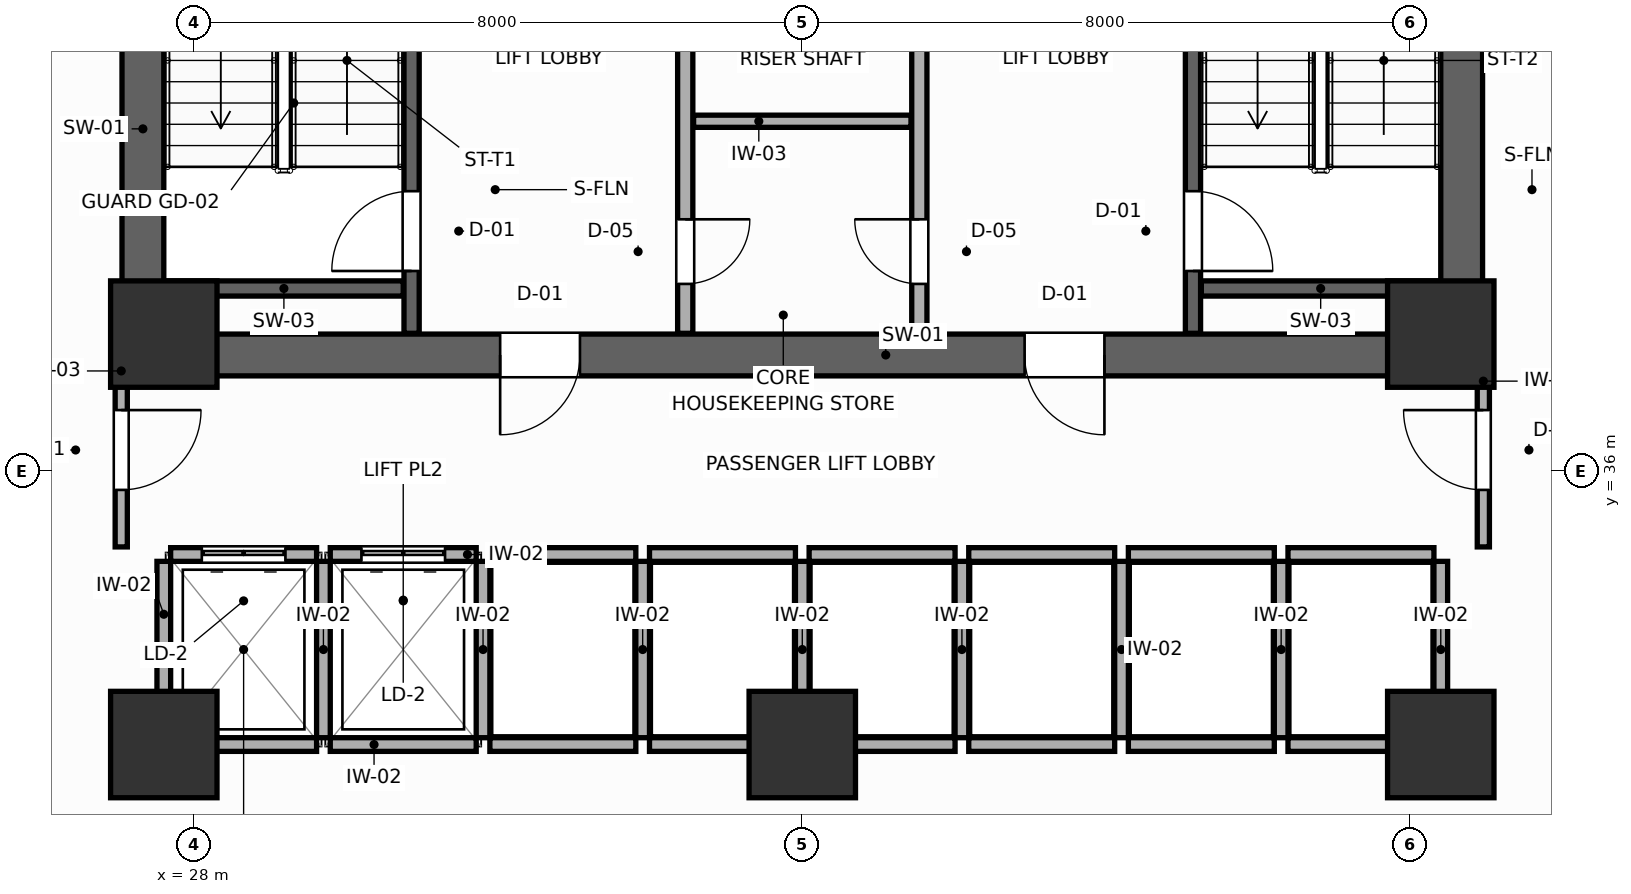
"""IFC4 building model, lengths in metres.
Left out: names, types, materials, properties, quantities, classifications, styles, units other than length and angle.
Written with IfcOpenShell. Run it as: python <this file> out.ifc"""

import sys

from ifc_helpers import new_model, si_unit, direction, frame, frame_2d, origin, origin_2d, place, context, subcontext, project, spatial, rectangle, extrude, source, transform, mapped, element, fill, save


model = new_model("IFC4")
c1 = context("Model", 3, precision=1e-05, world=origin(), true_north=direction((0.0, 1.0)))
c2 = subcontext(c1, "Body", "Model", "MODEL_VIEW")
j1 = project(units=[si_unit("LENGTHUNIT", "METRE"), si_unit("PLANEANGLEUNIT", "RADIAN")], contexts=[c1])
p1 = place(None, origin())
s1 = spatial("IfcSite", under=j1, at=p1, CompositionType="ELEMENT")
p2 = place(p1, origin())
s2 = spatial("IfcBuilding", under=s1, at=p2, CompositionType="ELEMENT")
p3 = place(p2, frame((0.0, 0.0, 87.3)))
s3 = spatial("IfcBuildingStorey", under=s2, at=p3, CompositionType="ELEMENT", Elevation=87.3)
p4 = place(p3, frame((27.05, 37.525, 0.0), z_axis=(0.0, 0.0, 1.0), x_axis=(1.0, 0.0, 0.0)))
e1 = element("IfcWall", 1, at=p4, inside=s3, PredefinedType="SHEAR", context=c2, shape_type="SweptSolid", body=[
    extrude(rectangle(XDim=17.9, YDim=0.55, at=frame_2d((8.95, 0.0))), origin(), (0.0, 0.0, 1.0), 3.9),
])
p5 = place(p4, frame((4.975, 0.0, 0.0)))
e2 = element("IfcOpeningElement", 2, at=p5, cuts=e1, PredefinedType="OPENING", context=c2, shape_type="SweptSolid", body=[
    extrude(rectangle(XDim=1.05, YDim=2.1, at=frame_2d((0.525, 1.05))), frame((0.0, 0.285, 0.0), z_axis=(0.0, -1.0, 0.0), x_axis=(1.0, 0.0, 0.0)), (0.0, 0.0, 1.0), 0.57),
])
p6 = place(p4, frame((11.875, 0.0, 0.0)))
e3 = element("IfcOpeningElement", 3, at=p6, cuts=e1, PredefinedType="OPENING", context=c2, shape_type="SweptSolid", body=[
    extrude(rectangle(XDim=1.05, YDim=2.1, at=frame_2d((0.525, 1.05))), frame((0.0, 0.285, 0.0), z_axis=(0.0, -1.0, 0.0), x_axis=(1.0, 0.0, 0.0)), (0.0, 0.0, 1.0), 0.57),
])
for number, where, z_axis, x_axis in (
    (4, (27.325, 37.8, 0.0), (0.0, 0.0, 1.0), (0.0, 1.0, 0.0)),
    (5, (44.675, 37.8, 0.0), (0.0, 0.0, 1.0), (0.0, 1.0, 0.0)),
):
    element("IfcWall", number, at=place(p3, frame(where, z_axis=z_axis, x_axis=x_axis)), inside=s3, PredefinedType="SHEAR", context=c2, shape_type="SweptSolid", body=[
        extrude(rectangle(XDim=9.0, YDim=0.55, at=frame_2d((4.5, 0.0))), origin(), (0.0, 0.0, 1.0), 3.9),
    ])
m1 = source(origin(), c2, "Body", "SweptSolid", [
    extrude(rectangle(XDim=1.4, YDim=1.4, at=origin_2d()), origin(), (0.0, 0.0, 1.0), 3.9),
])
for number, where, z_axis, x_axis in (
    (6, (27.6, 37.8, 0.0), (0.0, 0.0, 1.0), (1.0, 0.0, 0.0)),
    (7, (44.4, 37.8, 0.0), (0.0, 0.0, 1.0), (1.0, 0.0, 0.0)),
    (8, (27.6, 32.4, 0.0), (0.0, 0.0, 1.0), (1.0, 0.0, 0.0)),
    (9, (44.4, 32.4, 0.0), (0.0, 0.0, 1.0), (1.0, 0.0, 0.0)),
    (10, (36.0, 32.4, 0.0), (0.0, 0.0, 1.0), (1.0, 0.0, 0.0)),
):
    element("IfcColumn", number, at=place(p3, frame(where, z_axis=z_axis, x_axis=x_axis)), inside=s3, PredefinedType="COLUMN", context=c2, shape_type="MappedRepresentation", body=[
        mapped(m1, transform((0.0, 0.0, 0.0), scale=1.0)),
    ])
p7 = place(p3, frame((30.86, 37.81, 0.0), z_axis=(0.0, 0.0, 1.0), x_axis=(0.0, 1.0, 0.0)))
e11 = element("IfcWall", 11, at=p7, inside=s3, PredefinedType="SHEAR", context=c2, shape_type="SweptSolid", body=[
    extrude(rectangle(XDim=8.98, YDim=0.2, at=frame_2d((4.49, 0.0))), origin(), (0.0, 0.0, 1.0), 3.9),
])
p8 = place(p7, frame((0.82, 0.0, 0.0)))
e12 = element("IfcOpeningElement", 12, at=p8, cuts=e11, PredefinedType="OPENING", context=c2, shape_type="SweptSolid", body=[
    extrude(rectangle(XDim=1.05, YDim=2.1, at=frame_2d((0.525, 1.05))), frame((0.0, 0.11, 0.0), z_axis=(0.0, -1.0, 0.0), x_axis=(1.0, 0.0, 0.0)), (0.0, 0.0, 1.0), 0.22),
])
p9 = place(p3, frame((27.61, 38.4, 0.0), z_axis=(0.0, 0.0, 1.0), x_axis=(1.0, 0.0, 0.0)))
e13 = element("IfcWall", 13, at=p9, inside=s3, PredefinedType="SHEAR", context=c2, shape_type="SweptSolid", body=[
    extrude(rectangle(XDim=3.14, YDim=0.2, at=frame_2d((1.57, 0.0))), origin(), (0.0, 0.0, 1.0), 3.9),
])
p10 = place(p3, frame((41.14, 37.81, 0.0), z_axis=(0.0, 0.0, 1.0), x_axis=(0.0, 1.0, 0.0)))
e14 = element("IfcWall", 14, at=p10, inside=s3, PredefinedType="SHEAR", context=c2, shape_type="SweptSolid", body=[
    extrude(rectangle(XDim=8.98, YDim=0.2, at=frame_2d((4.49, 0.0))), origin(), (0.0, 0.0, 1.0), 3.9),
])
p11 = place(p10, frame((0.82, 0.0, 0.0)))
e15 = element("IfcOpeningElement", 15, at=p11, cuts=e14, PredefinedType="OPENING", context=c2, shape_type="SweptSolid", body=[
    extrude(rectangle(XDim=1.05, YDim=2.1, at=frame_2d((0.525, 1.05))), frame((0.0, 0.11, 0.0), z_axis=(0.0, -1.0, 0.0), x_axis=(1.0, 0.0, 0.0)), (0.0, 0.0, 1.0), 0.22),
])
p12 = place(p3, frame((41.25, 38.4, 0.0), z_axis=(0.0, 0.0, 1.0), x_axis=(1.0, 0.0, 0.0)))
e16 = element("IfcWall", 16, at=p12, inside=s3, PredefinedType="SHEAR", context=c2, shape_type="SweptSolid", body=[
    extrude(rectangle(XDim=3.14, YDim=0.2, at=frame_2d((1.57, 0.0))), origin(), (0.0, 0.0, 1.0), 3.9),
])
p13 = place(p3, frame((34.46, 37.81, 0.0), z_axis=(0.0, 0.0, 1.0), x_axis=(0.0, 1.0, 0.0)))
e17 = element("IfcWall", 17, at=p13, inside=s3, PredefinedType="PARTITIONING", context=c2, shape_type="SweptSolid", body=[
    extrude(rectangle(XDim=8.98, YDim=0.2, at=frame_2d((4.49, 0.0))), origin(), (0.0, 0.0, 1.0), 3.68),
])
p14 = place(p13, frame((0.65, 0.0, 0.0)))
e18 = element("IfcOpeningElement", 18, at=p14, cuts=e17, PredefinedType="OPENING", context=c2, shape_type="SweptSolid", body=[
    extrude(rectangle(XDim=0.85, YDim=2.05, at=frame_2d((0.425, 1.025))), frame((0.0, 0.11, 0.0), z_axis=(0.0, -1.0, 0.0), x_axis=(1.0, 0.0, 0.0)), (0.0, 0.0, 1.0), 0.22),
])
p15 = place(p3, frame((37.54, 37.81, 0.0), z_axis=(0.0, 0.0, 1.0), x_axis=(0.0, 1.0, 0.0)))
e19 = element("IfcWall", 19, at=p15, inside=s3, PredefinedType="PARTITIONING", context=c2, shape_type="SweptSolid", body=[
    extrude(rectangle(XDim=8.98, YDim=0.2, at=frame_2d((4.49, 0.0))), origin(), (0.0, 0.0, 1.0), 3.68),
])
p16 = place(p15, frame((0.65, 0.0, 0.0)))
e20 = element("IfcOpeningElement", 20, at=p16, cuts=e19, PredefinedType="OPENING", context=c2, shape_type="SweptSolid", body=[
    extrude(rectangle(XDim=0.85, YDim=2.05, at=frame_2d((0.425, 1.025))), frame((0.0, 0.11, 0.0), z_axis=(0.0, -1.0, 0.0), x_axis=(1.0, 0.0, 0.0)), (0.0, 0.0, 1.0), 0.22),
])
p17 = place(p3, frame((34.57, 40.6, 0.0), z_axis=(0.0, 0.0, 1.0), x_axis=(1.0, 0.0, 0.0)))
e21 = element("IfcWall", 21, at=p17, inside=s3, PredefinedType="PARTITIONING", context=c2, shape_type="SweptSolid", body=[
    extrude(rectangle(XDim=2.86, YDim=0.16, at=frame_2d((1.43, 0.0))), origin(), (0.0, 0.0, 1.0), 3.68),
])
p18 = place(p3, frame((27.69, 34.9, 0.0), z_axis=(0.0, 0.0, 1.0), x_axis=(1.0, 0.0, 0.0)))
e22 = element("IfcWall", 22, at=p18, inside=s3, PredefinedType="PARTITIONING", context=c2, shape_type="SweptSolid", body=[
    extrude(rectangle(XDim=1.92, YDim=0.18, at=frame_2d((0.96, 0.0))), origin(), (0.0, 0.0, 1.0), 3.68),
])
p19 = place(p18, frame((0.41, 0.0, 0.0)))
e23 = element("IfcOpeningElement", 23, at=p19, cuts=e22, PredefinedType="OPENING", context=c2, shape_type="SweptSolid", body=[
    extrude(rectangle(XDim=1.1, YDim=2.1, at=frame_2d((0.55, 1.05))), frame((0.0, 0.1, 0.0), z_axis=(0.0, -1.0, 0.0), x_axis=(1.0, 0.0, 0.0)), (0.0, 0.0, 1.0), 0.2),
])
p20 = place(p3, frame((27.69, 32.4, 0.0), z_axis=(0.0, 0.0, 1.0), x_axis=(1.0, 0.0, 0.0)))
e24 = element("IfcWall", 24, at=p20, inside=s3, PredefinedType="PARTITIONING", context=c2, shape_type="SweptSolid", body=[
    extrude(rectangle(XDim=1.92, YDim=0.18, at=frame_2d((0.96, 0.0))), origin(), (0.0, 0.0, 1.0), 3.18),
])
p21 = place(p3, frame((27.6, 32.49, 0.0), z_axis=(0.0, 0.0, 1.0), x_axis=(0.0, 1.0, 0.0)))
e25 = element("IfcWall", 25, at=p21, inside=s3, PredefinedType="PARTITIONING", context=c2, shape_type="SweptSolid", body=[
    extrude(rectangle(XDim=2.32, YDim=0.18, at=frame_2d((1.16, 0.0))), origin(), (0.0, 0.0, 1.0), 3.68),
])
p22 = place(p3, frame((29.79, 34.9, 0.0), z_axis=(0.0, 0.0, 1.0), x_axis=(1.0, 0.0, 0.0)))
e26 = element("IfcWall", 26, at=p22, inside=s3, PredefinedType="PARTITIONING", context=c2, shape_type="SweptSolid", body=[
    extrude(rectangle(XDim=1.92, YDim=0.18, at=frame_2d((0.96, 0.0))), origin(), (0.0, 0.0, 1.0), 3.68),
])
p23 = place(p22, frame((0.41, 0.0, 0.0)))
e27 = element("IfcOpeningElement", 27, at=p23, cuts=e26, PredefinedType="OPENING", context=c2, shape_type="SweptSolid", body=[
    extrude(rectangle(XDim=1.1, YDim=2.1, at=frame_2d((0.55, 1.05))), frame((0.0, 0.1, 0.0), z_axis=(0.0, -1.0, 0.0), x_axis=(1.0, 0.0, 0.0)), (0.0, 0.0, 1.0), 0.2),
])
p24 = place(p3, frame((29.79, 32.4, 0.0), z_axis=(0.0, 0.0, 1.0), x_axis=(1.0, 0.0, 0.0)))
e28 = element("IfcWall", 28, at=p24, inside=s3, PredefinedType="PARTITIONING", context=c2, shape_type="SweptSolid", body=[
    extrude(rectangle(XDim=1.92, YDim=0.18, at=frame_2d((0.96, 0.0))), origin(), (0.0, 0.0, 1.0), 3.18),
])
p25 = place(p3, frame((29.7, 32.49, 0.0), z_axis=(0.0, 0.0, 1.0), x_axis=(0.0, 1.0, 0.0)))
e29 = element("IfcWall", 29, at=p25, inside=s3, PredefinedType="PARTITIONING", context=c2, shape_type="SweptSolid", body=[
    extrude(rectangle(XDim=2.32, YDim=0.18, at=frame_2d((1.16, 0.0))), origin(), (0.0, 0.0, 1.0), 3.68),
])
p26 = place(p3, frame((31.89, 34.9, 0.0), z_axis=(0.0, 0.0, 1.0), x_axis=(1.0, 0.0, 0.0)))
e30 = element("IfcWall", 30, at=p26, inside=s3, PredefinedType="PARTITIONING", context=c2, shape_type="SweptSolid", body=[
    extrude(rectangle(XDim=1.92, YDim=0.18, at=frame_2d((0.96, 0.0))), origin(), (0.0, 0.0, 1.0), 3.68),
])
p27 = place(p3, frame((31.89, 32.4, 0.0), z_axis=(0.0, 0.0, 1.0), x_axis=(1.0, 0.0, 0.0)))
e31 = element("IfcWall", 31, at=p27, inside=s3, PredefinedType="PARTITIONING", context=c2, shape_type="SweptSolid", body=[
    extrude(rectangle(XDim=1.92, YDim=0.18, at=frame_2d((0.96, 0.0))), origin(), (0.0, 0.0, 1.0), 3.18),
])
p28 = place(p3, frame((31.8, 32.49, 0.0), z_axis=(0.0, 0.0, 1.0), x_axis=(0.0, 1.0, 0.0)))
e32 = element("IfcWall", 32, at=p28, inside=s3, PredefinedType="PARTITIONING", context=c2, shape_type="SweptSolid", body=[
    extrude(rectangle(XDim=2.32, YDim=0.18, at=frame_2d((1.16, 0.0))), origin(), (0.0, 0.0, 1.0), 3.68),
])
p29 = place(p3, frame((33.99, 34.9, 0.0), z_axis=(0.0, 0.0, 1.0), x_axis=(1.0, 0.0, 0.0)))
e33 = element("IfcWall", 33, at=p29, inside=s3, PredefinedType="PARTITIONING", context=c2, shape_type="SweptSolid", body=[
    extrude(rectangle(XDim=1.92, YDim=0.18, at=frame_2d((0.96, 0.0))), origin(), (0.0, 0.0, 1.0), 3.68),
])
p30 = place(p3, frame((33.99, 32.4, 0.0), z_axis=(0.0, 0.0, 1.0), x_axis=(1.0, 0.0, 0.0)))
e34 = element("IfcWall", 34, at=p30, inside=s3, PredefinedType="PARTITIONING", context=c2, shape_type="SweptSolid", body=[
    extrude(rectangle(XDim=1.92, YDim=0.18, at=frame_2d((0.96, 0.0))), origin(), (0.0, 0.0, 1.0), 3.18),
])
p31 = place(p3, frame((33.9, 32.49, 0.0), z_axis=(0.0, 0.0, 1.0), x_axis=(0.0, 1.0, 0.0)))
e35 = element("IfcWall", 35, at=p31, inside=s3, PredefinedType="PARTITIONING", context=c2, shape_type="SweptSolid", body=[
    extrude(rectangle(XDim=2.32, YDim=0.18, at=frame_2d((1.16, 0.0))), origin(), (0.0, 0.0, 1.0), 3.68),
])
p32 = place(p3, frame((36.09, 34.9, 0.0), z_axis=(0.0, 0.0, 1.0), x_axis=(1.0, 0.0, 0.0)))
e36 = element("IfcWall", 36, at=p32, inside=s3, PredefinedType="PARTITIONING", context=c2, shape_type="SweptSolid", body=[
    extrude(rectangle(XDim=1.92, YDim=0.18, at=frame_2d((0.96, 0.0))), origin(), (0.0, 0.0, 1.0), 3.68),
])
p33 = place(p3, frame((36.09, 32.4, 0.0), z_axis=(0.0, 0.0, 1.0), x_axis=(1.0, 0.0, 0.0)))
e37 = element("IfcWall", 37, at=p33, inside=s3, PredefinedType="PARTITIONING", context=c2, shape_type="SweptSolid", body=[
    extrude(rectangle(XDim=1.92, YDim=0.18, at=frame_2d((0.96, 0.0))), origin(), (0.0, 0.0, 1.0), 3.18),
])
p34 = place(p3, frame((36.0, 32.49, 0.0), z_axis=(0.0, 0.0, 1.0), x_axis=(0.0, 1.0, 0.0)))
e38 = element("IfcWall", 38, at=p34, inside=s3, PredefinedType="PARTITIONING", context=c2, shape_type="SweptSolid", body=[
    extrude(rectangle(XDim=2.32, YDim=0.18, at=frame_2d((1.16, 0.0))), origin(), (0.0, 0.0, 1.0), 3.68),
])
p35 = place(p3, frame((38.19, 34.9, 0.0), z_axis=(0.0, 0.0, 1.0), x_axis=(1.0, 0.0, 0.0)))
e39 = element("IfcWall", 39, at=p35, inside=s3, PredefinedType="PARTITIONING", context=c2, shape_type="SweptSolid", body=[
    extrude(rectangle(XDim=1.92, YDim=0.18, at=frame_2d((0.96, 0.0))), origin(), (0.0, 0.0, 1.0), 3.68),
])
p36 = place(p3, frame((38.19, 32.4, 0.0), z_axis=(0.0, 0.0, 1.0), x_axis=(1.0, 0.0, 0.0)))
e40 = element("IfcWall", 40, at=p36, inside=s3, PredefinedType="PARTITIONING", context=c2, shape_type="SweptSolid", body=[
    extrude(rectangle(XDim=1.92, YDim=0.18, at=frame_2d((0.96, 0.0))), origin(), (0.0, 0.0, 1.0), 3.18),
])
p37 = place(p3, frame((38.1, 32.49, 0.0), z_axis=(0.0, 0.0, 1.0), x_axis=(0.0, 1.0, 0.0)))
e41 = element("IfcWall", 41, at=p37, inside=s3, PredefinedType="PARTITIONING", context=c2, shape_type="SweptSolid", body=[
    extrude(rectangle(XDim=2.32, YDim=0.18, at=frame_2d((1.16, 0.0))), origin(), (0.0, 0.0, 1.0), 3.68),
])
p38 = place(p3, frame((40.29, 34.9, 0.0), z_axis=(0.0, 0.0, 1.0), x_axis=(1.0, 0.0, 0.0)))
e42 = element("IfcWall", 42, at=p38, inside=s3, PredefinedType="PARTITIONING", context=c2, shape_type="SweptSolid", body=[
    extrude(rectangle(XDim=1.92, YDim=0.18, at=frame_2d((0.96, 0.0))), origin(), (0.0, 0.0, 1.0), 3.68),
])
p39 = place(p3, frame((40.29, 32.4, 0.0), z_axis=(0.0, 0.0, 1.0), x_axis=(1.0, 0.0, 0.0)))
e43 = element("IfcWall", 43, at=p39, inside=s3, PredefinedType="PARTITIONING", context=c2, shape_type="SweptSolid", body=[
    extrude(rectangle(XDim=1.92, YDim=0.18, at=frame_2d((0.96, 0.0))), origin(), (0.0, 0.0, 1.0), 3.18),
])
p40 = place(p3, frame((40.2, 32.49, 0.0), z_axis=(0.0, 0.0, 1.0), x_axis=(0.0, 1.0, 0.0)))
e44 = element("IfcWall", 44, at=p40, inside=s3, PredefinedType="PARTITIONING", context=c2, shape_type="SweptSolid", body=[
    extrude(rectangle(XDim=2.32, YDim=0.18, at=frame_2d((1.16, 0.0))), origin(), (0.0, 0.0, 1.0), 3.68),
])
p41 = place(p3, frame((42.39, 34.9, 0.0), z_axis=(0.0, 0.0, 1.0), x_axis=(1.0, 0.0, 0.0)))
e45 = element("IfcWall", 45, at=p41, inside=s3, PredefinedType="PARTITIONING", context=c2, shape_type="SweptSolid", body=[
    extrude(rectangle(XDim=1.92, YDim=0.18, at=frame_2d((0.96, 0.0))), origin(), (0.0, 0.0, 1.0), 3.68),
])
p42 = place(p3, frame((42.39, 32.4, 0.0), z_axis=(0.0, 0.0, 1.0), x_axis=(1.0, 0.0, 0.0)))
e46 = element("IfcWall", 46, at=p42, inside=s3, PredefinedType="PARTITIONING", context=c2, shape_type="SweptSolid", body=[
    extrude(rectangle(XDim=1.92, YDim=0.18, at=frame_2d((0.96, 0.0))), origin(), (0.0, 0.0, 1.0), 3.18),
])
for number, where, z_axis, x_axis in (
    (47, (42.3, 32.49, 0.0), (0.0, 0.0, 1.0), (0.0, 1.0, 0.0)),
    (48, (44.4, 32.49, 0.0), (0.0, 0.0, 1.0), (0.0, 1.0, 0.0)),
):
    element("IfcWall", number, at=place(p3, frame(where, z_axis=z_axis, x_axis=x_axis)), inside=s3, PredefinedType="PARTITIONING", context=c2, shape_type="SweptSolid", body=[
        extrude(rectangle(XDim=2.32, YDim=0.18, at=frame_2d((1.16, 0.0))), origin(), (0.0, 0.0, 1.0), 3.68),
    ])
p43 = place(p3, frame((27.04, 35.0, 0.0), z_axis=(0.0, 0.0, 1.0), x_axis=(0.0, 1.0, 0.0)))
e49 = element("IfcWall", 49, at=p43, inside=s3, PredefinedType="PARTITIONING", context=c2, shape_type="SweptSolid", body=[
    extrude(rectangle(XDim=2.65, YDim=0.16, at=frame_2d((1.325, 0.0))), origin(), (0.0, 0.0, 1.0), 3.68),
])
p44 = place(p43, frame((0.75, 0.0, 0.0)))
e50 = element("IfcOpeningElement", 50, at=p44, cuts=e49, PredefinedType="OPENING", context=c2, shape_type="SweptSolid", body=[
    extrude(rectangle(XDim=1.05, YDim=2.1, at=frame_2d((0.525, 1.05))), frame((0.0, 0.09, 0.0), z_axis=(0.0, -1.0, 0.0), x_axis=(1.0, 0.0, 0.0)), (0.0, 0.0, 1.0), 0.18),
])
p45 = place(p3, frame((44.96, 35.0, 0.0), z_axis=(0.0, 0.0, 1.0), x_axis=(0.0, 1.0, 0.0)))
e51 = element("IfcWall", 51, at=p45, inside=s3, PredefinedType="PARTITIONING", context=c2, shape_type="SweptSolid", body=[
    extrude(rectangle(XDim=2.65, YDim=0.16, at=frame_2d((1.325, 0.0))), origin(), (0.0, 0.0, 1.0), 3.68),
])
p46 = place(p45, frame((0.75, 0.0, 0.0)))
e52 = element("IfcOpeningElement", 52, at=p46, cuts=e51, PredefinedType="OPENING", context=c2, shape_type="SweptSolid", body=[
    extrude(rectangle(XDim=1.05, YDim=2.1, at=frame_2d((0.525, 1.05))), frame((0.0, 0.09, 0.0), z_axis=(0.0, -1.0, 0.0), x_axis=(1.0, 0.0, 0.0)), (0.0, 0.0, 1.0), 0.18),
])
p47 = place(p8, origin())
e53 = element("IfcDoor", 53, at=p47, inside=s3, OperationType="SINGLE_SWING_LEFT", PredefinedType="DOOR", context=c2, shape_type="SweptSolid", body=[
    extrude(rectangle(XDim=1.05, YDim=2.1, at=frame_2d((0.525, 1.05))), frame((0.0, 0.025, 0.0), z_axis=(0.0, -1.0, 0.0), x_axis=(1.0, 0.0, 0.0)), (0.0, 0.0, 1.0), 0.05),
])
fill(e12, e53)
p48 = place(p11, frame((1.05, 0.0, 0.0), z_axis=(0.0, 0.0, 1.0), x_axis=(-1.0, 0.0, 0.0)))
e54 = element("IfcDoor", 54, at=p48, inside=s3, OperationType="SINGLE_SWING_RIGHT", PredefinedType="DOOR", context=c2, shape_type="SweptSolid", body=[
    extrude(rectangle(XDim=1.05, YDim=2.1, at=frame_2d((0.525, 1.05))), frame((0.0, 0.025, 0.0), z_axis=(0.0, -1.0, 0.0), x_axis=(1.0, 0.0, 0.0)), (0.0, 0.0, 1.0), 0.05),
])
fill(e15, e54)
p49 = place(p14, frame((0.85, 0.0, 0.0), z_axis=(0.0, 0.0, 1.0), x_axis=(-1.0, 0.0, 0.0)))
e55 = element("IfcDoor", 55, at=p49, inside=s3, OperationType="SINGLE_SWING_LEFT", PredefinedType="DOOR", context=c2, shape_type="SweptSolid", body=[
    extrude(rectangle(XDim=0.85, YDim=2.05, at=frame_2d((0.425, 1.025))), frame((0.0, 0.025, 0.0), z_axis=(0.0, -1.0, 0.0), x_axis=(1.0, 0.0, 0.0)), (0.0, 0.0, 1.0), 0.05),
])
fill(e18, e55)
p50 = place(p16, origin())
e56 = element("IfcDoor", 56, at=p50, inside=s3, OperationType="SINGLE_SWING_RIGHT", PredefinedType="DOOR", context=c2, shape_type="SweptSolid", body=[
    extrude(rectangle(XDim=0.85, YDim=2.05, at=frame_2d((0.425, 1.025))), frame((0.0, 0.025, 0.0), z_axis=(0.0, -1.0, 0.0), x_axis=(1.0, 0.0, 0.0)), (0.0, 0.0, 1.0), 0.05),
])
fill(e20, e56)
p51 = place(p19, origin())
e57 = element("IfcDoor", 57, at=p51, inside=s3, OperationType="DOUBLE_DOOR_SLIDING", PredefinedType="DOOR", context=c2, shape_type="SweptSolid", body=[
    extrude(rectangle(XDim=1.1, YDim=2.1, at=frame_2d((0.55, 1.05))), frame((0.0, 0.025, 0.0), z_axis=(0.0, -1.0, 0.0), x_axis=(1.0, 0.0, 0.0)), (0.0, 0.0, 1.0), 0.05),
])
fill(e23, e57)
p52 = place(p23, origin())
e58 = element("IfcDoor", 58, at=p52, inside=s3, OperationType="DOUBLE_DOOR_SLIDING", PredefinedType="DOOR", context=c2, shape_type="SweptSolid", body=[
    extrude(rectangle(XDim=1.1, YDim=2.1, at=frame_2d((0.55, 1.05))), frame((0.0, 0.025, 0.0), z_axis=(0.0, -1.0, 0.0), x_axis=(1.0, 0.0, 0.0)), (0.0, 0.0, 1.0), 0.05),
])
fill(e27, e58)
p53 = place(p44, frame((1.05, 0.0, 0.0), z_axis=(0.0, 0.0, 1.0), x_axis=(-1.0, 0.0, 0.0)))
e59 = element("IfcDoor", 59, at=p53, inside=s3, OperationType="SINGLE_SWING_LEFT", PredefinedType="DOOR", context=c2, shape_type="SweptSolid", body=[
    extrude(rectangle(XDim=1.05, YDim=2.1, at=frame_2d((0.525, 1.05))), frame((0.0, 0.025, 0.0), z_axis=(0.0, -1.0, 0.0), x_axis=(1.0, 0.0, 0.0)), (0.0, 0.0, 1.0), 0.05),
])
fill(e50, e59)
p54 = place(p46, origin())
e60 = element("IfcDoor", 60, at=p54, inside=s3, OperationType="SINGLE_SWING_RIGHT", PredefinedType="DOOR", context=c2, shape_type="SweptSolid", body=[
    extrude(rectangle(XDim=1.05, YDim=2.1, at=frame_2d((0.525, 1.05))), frame((0.0, 0.025, 0.0), z_axis=(0.0, -1.0, 0.0), x_axis=(1.0, 0.0, 0.0)), (0.0, 0.0, 1.0), 0.05),
])
fill(e52, e60)
p55 = place(p5, frame((1.05, 0.0, 0.0), z_axis=(0.0, 0.0, 1.0), x_axis=(-1.0, 0.0, 0.0)))
e61 = element("IfcDoor", 61, at=p55, inside=s3, OperationType="SINGLE_SWING_RIGHT", PredefinedType="DOOR", context=c2, shape_type="SweptSolid", body=[
    extrude(rectangle(XDim=1.05, YDim=2.1, at=frame_2d((0.525, 1.05))), frame((0.0, 0.025, 0.0), z_axis=(0.0, -1.0, 0.0), x_axis=(1.0, 0.0, 0.0)), (0.0, 0.0, 1.0), 0.05),
])
fill(e2, e61)
p56 = place(p6, frame((1.05, 0.0, 0.0), z_axis=(0.0, 0.0, 1.0), x_axis=(-1.0, 0.0, 0.0)))
e62 = element("IfcDoor", 62, at=p56, inside=s3, OperationType="SINGLE_SWING_LEFT", PredefinedType="DOOR", context=c2, shape_type="SweptSolid", body=[
    extrude(rectangle(XDim=1.05, YDim=2.1, at=frame_2d((0.525, 1.05))), frame((0.0, 0.025, 0.0), z_axis=(0.0, -1.0, 0.0), x_axis=(1.0, 0.0, 0.0)), (0.0, 0.0, 1.0), 0.05),
])
fill(e3, e62)
save(model, sys.argv[1])
